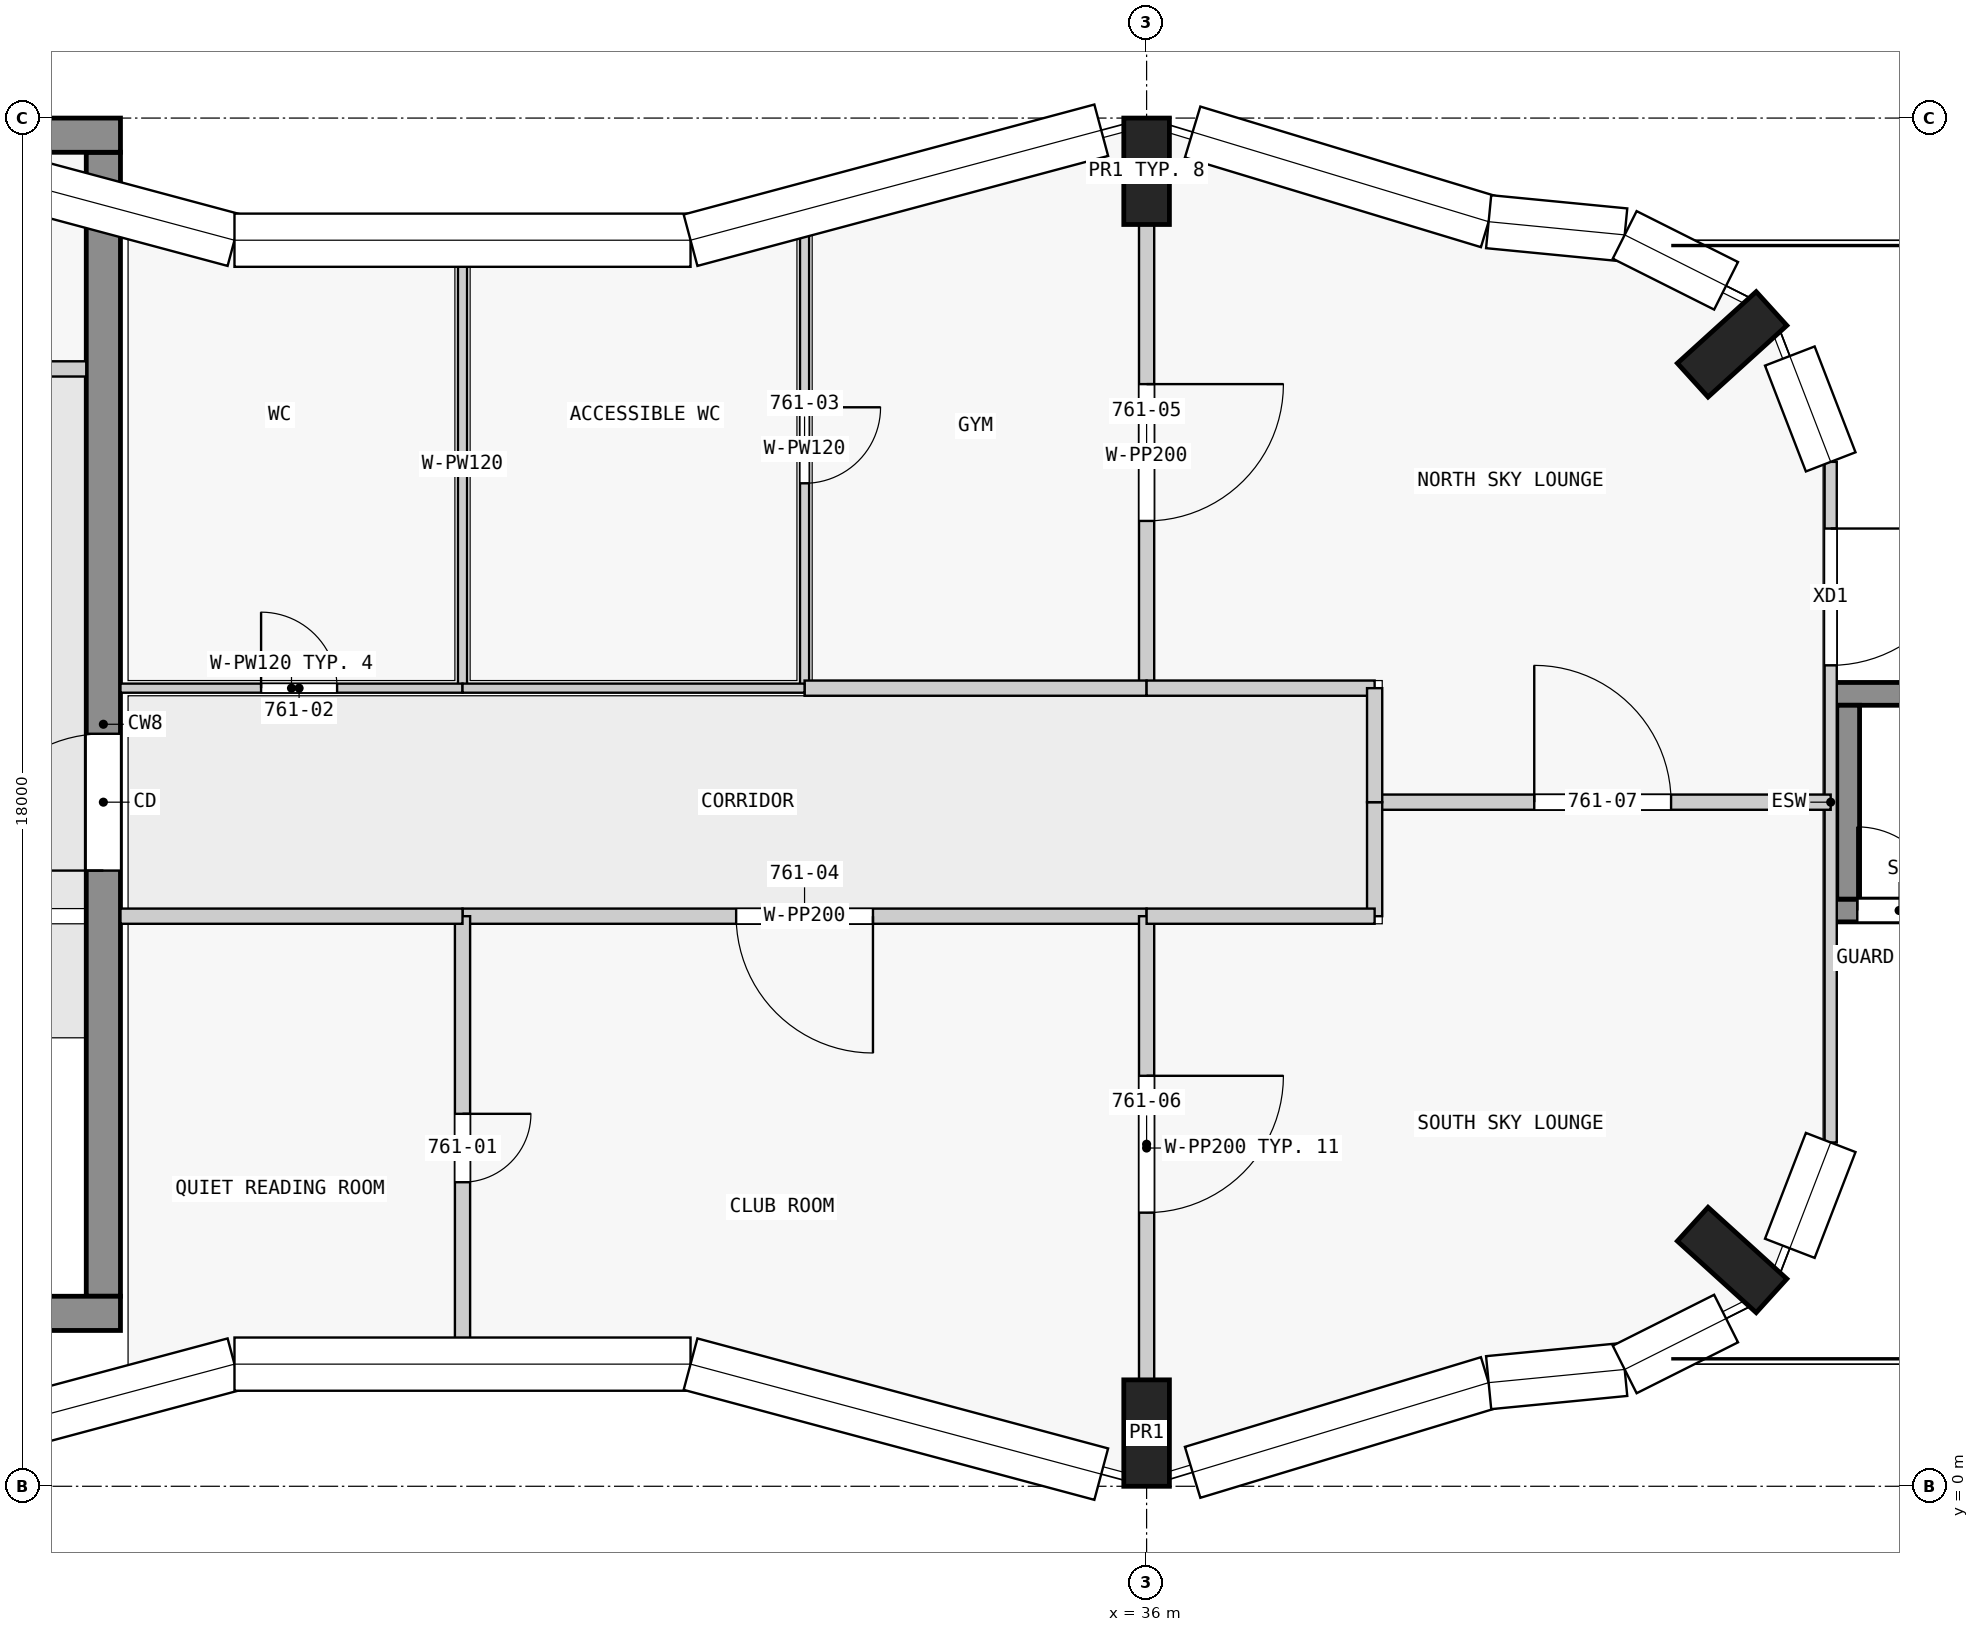
"""IFC4 building model, lengths in metres.
Left out: names, types, materials, properties, quantities, classifications, styles, units other than length and angle.
Written with IfcOpenShell. Run it as: python <this file> out.ifc"""

import sys

from ifc_helpers import new_model, si_unit, direction, frame, frame_2d, origin, origin_2d, place, context, subcontext, project, spatial, rectangle, extrude, element, fill, save


model = new_model("IFC4")
c1 = context("Model", 3, precision=1e-05, world=origin(), true_north=direction((0.0, 1.0)))
c2 = subcontext(c1, "Body", "Model", "MODEL_VIEW")
j1 = project(units=[si_unit("LENGTHUNIT", "METRE"), si_unit("PLANEANGLEUNIT", "RADIAN")], contexts=[c1])
p1 = place(None, origin())
s1 = spatial("IfcSite", under=j1, at=p1, CompositionType="ELEMENT")
p2 = place(p1, origin())
s2 = spatial("IfcBuilding", under=s1, at=p2, CompositionType="ELEMENT")
p3 = place(p2, frame((0.0, 0.0, 287.9)))
s3 = spatial("IfcBuildingStorey", under=s2, at=p3, CompositionType="ELEMENT", Elevation=287.9)
for number, where, z_axis, x_axis in (
    (1, (36.0, 0.7, 0.0), (0.0, 0.0, 1.0), (1.0, 0.0, 0.0)),
    (2, (43.703, 2.977, 0.0), (0.0, 0.0, 1.0), (0.672, 0.74, 0.0)),
    (3, (43.703, 15.023, 0.0), (0.0, 0.0, 1.0), (-0.672, 0.74, 0.0)),
    (4, (36.0, 17.3, 0.0), (0.0, 0.0, 1.0), (1.0, 0.0, 0.0)),
):
    element("IfcColumn", number, at=place(p3, frame(where, z_axis=z_axis, x_axis=x_axis)), inside=s3, PredefinedType="COLUMN", context=c2, shape_type="SweptSolid", body=[
        extrude(rectangle(XDim=0.6, YDim=1.4, at=origin_2d()), origin(), (0.0, 0.0, 1.0), 3.5),
    ])
for number, where, z_axis, x_axis in (
    (5, (1.85, 2.275, 0.0), (0.0, 0.0, 1.0), (1.0, 0.0, 0.0)),
    (6, (1.85, 17.775, 0.0), (0.0, 0.0, 1.0), (1.0, 0.0, 0.0)),
):
    element("IfcWall", number, at=place(p3, frame(where, z_axis=z_axis, x_axis=x_axis)), inside=s3, PredefinedType="SHEAR", context=c2, shape_type="SweptSolid", body=[
        extrude(rectangle(XDim=20.65, YDim=0.45, at=frame_2d((10.325, 0.0))), origin(), (0.0, 0.0, 1.0), 3.25),
    ])
p4 = place(p3, frame((22.275, 2.5, 0.0), z_axis=(0.0, 0.0, 1.0), x_axis=(0.0, 1.0, 0.0)))
e7 = element("IfcWall", 7, at=p4, inside=s3, PredefinedType="SHEAR", context=c2, shape_type="SweptSolid", body=[
    extrude(rectangle(XDim=15.05, YDim=0.45, at=frame_2d((7.525, 0.0))), origin(), (0.0, 0.0, 1.0), 3.25),
])
p5 = place(p4, frame((5.6, 0.0, 0.0)))
e8 = element("IfcOpeningElement", 8, at=p5, cuts=e7, PredefinedType="OPENING", context=c2, shape_type="SweptSolid", body=[
    extrude(rectangle(XDim=1.8, YDim=2.1, at=frame_2d((0.9, 1.05))), frame((0.0, 0.235, 0.0), z_axis=(0.0, -1.0, 0.0), x_axis=(1.0, 0.0, 0.0)), (0.0, 0.0, 1.0), 0.47),
])
p6 = place(p3, frame((45.23, 7.725, 0.0), z_axis=(0.0, 0.0, 1.0), x_axis=(0.0, 1.0, 0.0)))
e9 = element("IfcWall", 9, at=p6, inside=s3, PredefinedType="SHEAR", context=c2, shape_type="SweptSolid", body=[
    extrude(rectangle(XDim=2.55, YDim=0.3, at=frame_2d((1.275, 0.0))), origin(), (0.0, 0.0, 1.0), 3.25),
])
p7 = place(p3, frame((45.0, 7.575, 0.0), z_axis=(0.0, 0.0, 1.0), x_axis=(1.0, 0.0, 0.0)))
e10 = element("IfcWall", 10, at=p7, inside=s3, PredefinedType="SHEAR", context=c2, shape_type="SweptSolid", body=[
    extrude(rectangle(XDim=7.2, YDim=0.3, at=frame_2d((3.6, 0.0))), origin(), (0.0, 0.0, 1.0), 3.25),
])
p8 = place(p7, frame((0.35, 0.0, 0.0)))
e11 = element("IfcOpeningElement", 11, at=p8, cuts=e10, PredefinedType="OPENING", context=c2, shape_type="SweptSolid", body=[
    extrude(rectangle(XDim=1.1, YDim=2.1, at=frame_2d((0.55, 1.05))), frame((0.0, 0.16, 0.0), z_axis=(0.0, -1.0, 0.0), x_axis=(1.0, 0.0, 0.0)), (0.0, 0.0, 1.0), 0.32),
])
p9 = place(p3, frame((45.0, 10.425, 0.0), z_axis=(0.0, 0.0, 1.0), x_axis=(1.0, 0.0, 0.0)))
e12 = element("IfcWall", 12, at=p9, inside=s3, PredefinedType="SHEAR", context=c2, shape_type="SweptSolid", body=[
    extrude(rectangle(XDim=7.2, YDim=0.3, at=frame_2d((3.6, 0.0))), origin(), (0.0, 0.0, 1.0), 3.25),
])
p10 = place(p3, frame((45.0, 13.477, 0.0), z_axis=(0.0, 0.0, 1.0), x_axis=(0.0, -1.0, 0.0)))
e13 = element("IfcWall", 13, at=p10, inside=s3, PredefinedType="STANDARD", context=c2, shape_type="SweptSolid", body=[
    extrude(rectangle(XDim=8.954, YDim=0.16, at=frame_2d((4.477, 0.0))), origin(), (0.0, 0.0, 1.0), 3.25),
])
p11 = place(p10, frame((0.877, 0.0, 0.0)))
e14 = element("IfcOpeningElement", 14, at=p11, cuts=e13, PredefinedType="OPENING", context=c2, shape_type="SweptSolid", body=[
    extrude(rectangle(XDim=1.8, YDim=2.4, at=frame_2d((0.9, 1.2))), frame((0.0, 0.09, 0.0), z_axis=(0.0, -1.0, 0.0), x_axis=(1.0, 0.0, 0.0)), (0.0, 0.0, 1.0), 0.18),
])
p12 = place(p3, frame((18.6, 14.7, 0.0), z_axis=(0.0, 0.0, 1.0), x_axis=(1.0, 0.0, 0.0)))
e15 = element("IfcWall", 15, at=p12, inside=s3, PredefinedType="PARTITIONING", context=c2, shape_type="SweptSolid", body=[
    extrude(rectangle(XDim=3.45, YDim=0.2, at=frame_2d((1.725, 0.0))), origin(), (0.0, 0.0, 1.0), 3.25),
])
p13 = place(p12, frame((0.3, 0.0, 0.0)))
e16 = element("IfcOpeningElement", 16, at=p13, cuts=e15, PredefinedType="OPENING", context=c2, shape_type="SweptSolid", body=[
    extrude(rectangle(XDim=0.9, YDim=2.1, at=frame_2d((0.45, 1.05))), frame((0.0, 0.11, 0.0), z_axis=(0.0, -1.0, 0.0), x_axis=(1.0, 0.0, 0.0)), (0.0, 0.0, 1.0), 0.22),
])
p14 = place(p12, frame((2.025, 0.0, 0.0)))
e17 = element("IfcOpeningElement", 17, at=p14, cuts=e15, PredefinedType="OPENING", context=c2, shape_type="SweptSolid", body=[
    extrude(rectangle(XDim=0.9, YDim=2.1, at=frame_2d((0.45, 1.05))), frame((0.0, 0.11, 0.0), z_axis=(0.0, -1.0, 0.0), x_axis=(1.0, 0.0, 0.0)), (0.0, 0.0, 1.0), 0.22),
])
p15 = place(p3, frame((36.0, 7.5, 0.0), z_axis=(0.0, 0.0, 1.0), x_axis=(-1.0, 0.0, 0.0)))
e18 = element("IfcWall", 18, at=p15, inside=s3, PredefinedType="PARTITIONING", context=c2, shape_type="SweptSolid", body=[
    extrude(rectangle(XDim=9.0, YDim=0.2, at=frame_2d((4.5, 0.0))), origin(), (0.0, 0.0, 1.0), 3.25),
])
p16 = place(p15, frame((3.6, 0.0, 0.0)))
e19 = element("IfcOpeningElement", 19, at=p16, cuts=e18, PredefinedType="OPENING", context=c2, shape_type="SweptSolid", body=[
    extrude(rectangle(XDim=1.8, YDim=2.1, at=frame_2d((0.9, 1.05))), frame((0.0, 0.11, 0.0), z_axis=(0.0, -1.0, 0.0), x_axis=(1.0, 0.0, 0.0)), (0.0, 0.0, 1.0), 0.22),
])
p17 = place(p3, frame((36.0, 16.6, 0.0), z_axis=(0.0, 0.0, 1.0), x_axis=(0.0, -1.0, 0.0)))
e20 = element("IfcWall", 20, at=p17, inside=s3, PredefinedType="PARTITIONING", context=c2, shape_type="SweptSolid", body=[
    extrude(rectangle(XDim=6.1, YDim=0.2, at=frame_2d((3.05, 0.0))), origin(), (0.0, 0.0, 1.0), 3.25),
])
p18 = place(p17, frame((2.1, 0.0, 0.0)))
e21 = element("IfcOpeningElement", 21, at=p18, cuts=e20, PredefinedType="OPENING", context=c2, shape_type="SweptSolid", body=[
    extrude(rectangle(XDim=1.8, YDim=2.1, at=frame_2d((0.9, 1.05))), frame((0.0, 0.11, 0.0), z_axis=(0.0, -1.0, 0.0), x_axis=(1.0, 0.0, 0.0)), (0.0, 0.0, 1.0), 0.22),
])
p19 = place(p3, frame((36.0, 7.5, 0.0), z_axis=(0.0, 0.0, 1.0), x_axis=(0.0, -1.0, 0.0)))
e22 = element("IfcWall", 22, at=p19, inside=s3, PredefinedType="PARTITIONING", context=c2, shape_type="SweptSolid", body=[
    extrude(rectangle(XDim=6.1, YDim=0.2, at=frame_2d((3.05, 0.0))), origin(), (0.0, 0.0, 1.0), 3.25),
])
p20 = place(p19, frame((2.1, 0.0, 0.0)))
e23 = element("IfcOpeningElement", 23, at=p20, cuts=e22, PredefinedType="OPENING", context=c2, shape_type="SweptSolid", body=[
    extrude(rectangle(XDim=1.8, YDim=2.1, at=frame_2d((0.9, 1.05))), frame((0.0, 0.11, 0.0), z_axis=(0.0, -1.0, 0.0), x_axis=(1.0, 0.0, 0.0)), (0.0, 0.0, 1.0), 0.22),
])
p21 = place(p3, frame((31.5, 16.795, 0.0), z_axis=(0.0, 0.0, 1.0), x_axis=(0.0, -1.0, 0.0)))
e24 = element("IfcWall", 24, at=p21, inside=s3, PredefinedType="PARTITIONING", context=c2, shape_type="SweptSolid", body=[
    extrude(rectangle(XDim=6.295, YDim=0.12, at=frame_2d((3.147, 0.0))), origin(), (0.0, 0.0, 1.0), 3.25),
])
p22 = place(p21, frame((2.6, 0.0, 0.0)))
e25 = element("IfcOpeningElement", 25, at=p22, cuts=e24, PredefinedType="OPENING", context=c2, shape_type="SweptSolid", body=[
    extrude(rectangle(XDim=1.0, YDim=2.1, at=frame_2d((0.5, 1.05))), frame((0.0, 0.07, 0.0), z_axis=(0.0, -1.0, 0.0), x_axis=(1.0, 0.0, 0.0)), (0.0, 0.0, 1.0), 0.14),
])
p23 = place(p3, frame((39.0, 9.0, 0.0), z_axis=(0.0, 0.0, 1.0), x_axis=(1.0, 0.0, 0.0)))
e26 = element("IfcWall", 26, at=p23, inside=s3, PredefinedType="PARTITIONING", context=c2, shape_type="SweptSolid", body=[
    extrude(rectangle(XDim=6.0, YDim=0.2, at=frame_2d((3.0, 0.0))), origin(), (0.0, 0.0, 1.0), 2.642),
])
p24 = place(p23, frame((2.1, 0.0, 0.0)))
e27 = element("IfcOpeningElement", 27, at=p24, cuts=e26, PredefinedType="OPENING", context=c2, shape_type="SweptSolid", body=[
    extrude(rectangle(XDim=1.8, YDim=2.1, at=frame_2d((0.9, 1.05))), frame((0.0, 0.11, 0.0), z_axis=(0.0, -1.0, 0.0), x_axis=(1.0, 0.0, 0.0)), (0.0, 0.0, 1.0), 0.22),
])
p25 = place(p3, frame((27.0, 16.393, 0.0), z_axis=(0.0, 0.0, 1.0), x_axis=(0.0, -1.0, 0.0)))
e28 = element("IfcWall", 28, at=p25, inside=s3, PredefinedType="PARTITIONING", context=c2, shape_type="SweptSolid", body=[
    extrude(rectangle(XDim=5.893, YDim=0.12, at=frame_2d((2.947, 0.0))), origin(), (0.0, 0.0, 1.0), 3.25),
])
p26 = place(p3, frame((27.0, 7.5, 0.0), z_axis=(0.0, 0.0, 1.0), x_axis=(0.0, -1.0, 0.0)))
e29 = element("IfcWall", 29, at=p26, inside=s3, PredefinedType="PARTITIONING", context=c2, shape_type="SweptSolid", body=[
    extrude(rectangle(XDim=5.893, YDim=0.2, at=frame_2d((2.947, 0.0))), origin(), (0.0, 0.0, 1.0), 3.25),
])
p27 = place(p26, frame((2.6, 0.0, 0.0)))
e30 = element("IfcOpeningElement", 30, at=p27, cuts=e29, PredefinedType="OPENING", context=c2, shape_type="SweptSolid", body=[
    extrude(rectangle(XDim=0.9, YDim=2.1, at=frame_2d((0.45, 1.05))), frame((0.0, 0.11, 0.0), z_axis=(0.0, -1.0, 0.0), x_axis=(1.0, 0.0, 0.0)), (0.0, 0.0, 1.0), 0.22),
])
p28 = place(p3, frame((39.0, 9.0, 0.0), z_axis=(0.0, 0.0, 1.0), x_axis=(0.0, -1.0, 0.0)))
e31 = element("IfcWall", 31, at=p28, inside=s3, PredefinedType="PARTITIONING", context=c2, shape_type="SweptSolid", body=[
    extrude(rectangle(XDim=1.5, YDim=0.2, at=frame_2d((0.75, 0.0))), origin(), (0.0, 0.0, 1.0), 3.25),
])
p29 = place(p3, frame((39.0, 7.5, 0.0), z_axis=(0.0, 0.0, 1.0), x_axis=(-1.0, 0.0, 0.0)))
e32 = element("IfcWall", 32, at=p29, inside=s3, PredefinedType="PARTITIONING", context=c2, shape_type="SweptSolid", body=[
    extrude(rectangle(XDim=3.0, YDim=0.2, at=frame_2d((1.5, 0.0))), origin(), (0.0, 0.0, 1.0), 3.25),
])
p30 = place(p3, frame((31.5, 10.5, 0.0), z_axis=(0.0, 0.0, 1.0), x_axis=(1.0, 0.0, 0.0)))
e33 = element("IfcWall", 33, at=p30, inside=s3, PredefinedType="PARTITIONING", context=c2, shape_type="SweptSolid", body=[
    extrude(rectangle(XDim=4.5, YDim=0.2, at=frame_2d((2.25, 0.0))), origin(), (0.0, 0.0, 1.0), 3.25),
])
p31 = place(p3, frame((22.5, 10.5, 0.0), z_axis=(0.0, 0.0, 1.0), x_axis=(1.0, 0.0, 0.0)))
e34 = element("IfcWall", 34, at=p31, inside=s3, PredefinedType="PARTITIONING", context=c2, shape_type="SweptSolid", body=[
    extrude(rectangle(XDim=4.5, YDim=0.12, at=frame_2d((2.25, 0.0))), origin(), (0.0, 0.0, 1.0), 3.25),
])
p32 = place(p31, frame((1.85, 0.0, 0.0)))
e35 = element("IfcOpeningElement", 35, at=p32, cuts=e34, PredefinedType="OPENING", context=c2, shape_type="SweptSolid", body=[
    extrude(rectangle(XDim=1.0, YDim=2.1, at=frame_2d((0.5, 1.05))), frame((0.0, 0.07, 0.0), z_axis=(0.0, -1.0, 0.0), x_axis=(1.0, 0.0, 0.0)), (0.0, 0.0, 1.0), 0.14),
])
p33 = place(p3, frame((27.0, 10.5, 0.0), z_axis=(0.0, 0.0, 1.0), x_axis=(1.0, 0.0, 0.0)))
e36 = element("IfcWall", 36, at=p33, inside=s3, PredefinedType="PARTITIONING", context=c2, shape_type="SweptSolid", body=[
    extrude(rectangle(XDim=4.5, YDim=0.12, at=frame_2d((2.25, 0.0))), origin(), (0.0, 0.0, 1.0), 3.25),
])
p34 = place(p3, frame((27.0, 7.5, 0.0), z_axis=(0.0, 0.0, 1.0), x_axis=(-1.0, 0.0, 0.0)))
e37 = element("IfcWall", 37, at=p34, inside=s3, PredefinedType="PARTITIONING", context=c2, shape_type="SweptSolid", body=[
    extrude(rectangle(XDim=4.5, YDim=0.2, at=frame_2d((2.25, 0.0))), origin(), (0.0, 0.0, 1.0), 3.25),
])
p35 = place(p3, frame((36.0, 10.5, 0.0), z_axis=(0.0, 0.0, 1.0), x_axis=(1.0, 0.0, 0.0)))
e38 = element("IfcWall", 38, at=p35, inside=s3, PredefinedType="PARTITIONING", context=c2, shape_type="SweptSolid", body=[
    extrude(rectangle(XDim=3.0, YDim=0.2, at=frame_2d((1.5, 0.0))), origin(), (0.0, 0.0, 1.0), 3.25),
])
p36 = place(p3, frame((39.0, 10.5, 0.0), z_axis=(0.0, 0.0, 1.0), x_axis=(0.0, -1.0, 0.0)))
e39 = element("IfcWall", 39, at=p36, inside=s3, PredefinedType="PARTITIONING", context=c2, shape_type="SweptSolid", body=[
    extrude(rectangle(XDim=1.5, YDim=0.2, at=frame_2d((0.75, 0.0))), origin(), (0.0, 0.0, 1.0), 3.25),
])
p37 = place(p11, origin())
e40 = element("IfcDoor", 40, at=p37, inside=s3, OperationType="SINGLE_SWING_LEFT", PredefinedType="DOOR", context=c2, shape_type="SweptSolid", body=[
    extrude(rectangle(XDim=1.8, YDim=2.4, at=frame_2d((0.9, 1.2))), frame((0.0, 0.025, 0.0), z_axis=(0.0, -1.0, 0.0), x_axis=(1.0, 0.0, 0.0)), (0.0, 0.0, 1.0), 0.05),
])
fill(e14, e40)
p38 = place(p5, origin())
e41 = element("IfcDoor", 41, at=p38, inside=s3, OperationType="DOUBLE_DOOR_SINGLE_SWING", PredefinedType="DOOR", context=c2, shape_type="SweptSolid", body=[
    extrude(rectangle(XDim=1.8, YDim=2.1, at=frame_2d((0.9, 1.05))), frame((0.0, 0.025, 0.0), z_axis=(0.0, -1.0, 0.0), x_axis=(1.0, 0.0, 0.0)), (0.0, 0.0, 1.0), 0.05),
])
fill(e8, e41)
p39 = place(p8, origin())
e42 = element("IfcDoor", 42, at=p39, inside=s3, OperationType="SINGLE_SWING_LEFT", PredefinedType="DOOR", context=c2, shape_type="SweptSolid", body=[
    extrude(rectangle(XDim=1.1, YDim=2.1, at=frame_2d((0.55, 1.05))), frame((0.0, 0.025, 0.0), z_axis=(0.0, -1.0, 0.0), x_axis=(1.0, 0.0, 0.0)), (0.0, 0.0, 1.0), 0.05),
])
fill(e11, e42)
p40 = place(p27, origin())
e43 = element("IfcDoor", 43, at=p40, inside=s3, OperationType="SINGLE_SWING_LEFT", PredefinedType="DOOR", context=c2, shape_type="SweptSolid", body=[
    extrude(rectangle(XDim=0.9, YDim=2.1, at=frame_2d((0.45, 1.05))), frame((0.0, 0.025, 0.0), z_axis=(0.0, -1.0, 0.0), x_axis=(1.0, 0.0, 0.0)), (0.0, 0.0, 1.0), 0.05),
])
fill(e30, e43)
p41 = place(p32, origin())
e44 = element("IfcDoor", 44, at=p41, inside=s3, OperationType="SINGLE_SWING_LEFT", PredefinedType="DOOR", context=c2, shape_type="SweptSolid", body=[
    extrude(rectangle(XDim=1.0, YDim=2.1, at=frame_2d((0.5, 1.05))), frame((0.0, 0.025, 0.0), z_axis=(0.0, -1.0, 0.0), x_axis=(1.0, 0.0, 0.0)), (0.0, 0.0, 1.0), 0.05),
])
fill(e35, e44)
p42 = place(p22, origin())
e45 = element("IfcDoor", 45, at=p42, inside=s3, OperationType="SINGLE_SWING_LEFT", PredefinedType="DOOR", context=c2, shape_type="SweptSolid", body=[
    extrude(rectangle(XDim=1.0, YDim=2.1, at=frame_2d((0.5, 1.05))), frame((0.0, 0.025, 0.0), z_axis=(0.0, -1.0, 0.0), x_axis=(1.0, 0.0, 0.0)), (0.0, 0.0, 1.0), 0.05),
])
fill(e25, e45)
p43 = place(p16, origin())
e46 = element("IfcDoor", 46, at=p43, inside=s3, OperationType="DOUBLE_DOOR_SINGLE_SWING", PredefinedType="DOOR", context=c2, shape_type="SweptSolid", body=[
    extrude(rectangle(XDim=1.8, YDim=2.1, at=frame_2d((0.9, 1.05))), frame((0.0, 0.025, 0.0), z_axis=(0.0, -1.0, 0.0), x_axis=(1.0, 0.0, 0.0)), (0.0, 0.0, 1.0), 0.05),
])
fill(e19, e46)
p44 = place(p18, origin())
e47 = element("IfcDoor", 47, at=p44, inside=s3, OperationType="DOUBLE_DOOR_SINGLE_SWING", PredefinedType="DOOR", context=c2, shape_type="SweptSolid", body=[
    extrude(rectangle(XDim=1.8, YDim=2.1, at=frame_2d((0.9, 1.05))), frame((0.0, 0.025, 0.0), z_axis=(0.0, -1.0, 0.0), x_axis=(1.0, 0.0, 0.0)), (0.0, 0.0, 1.0), 0.05),
])
fill(e21, e47)
p45 = place(p20, origin())
e48 = element("IfcDoor", 48, at=p45, inside=s3, OperationType="DOUBLE_DOOR_SINGLE_SWING", PredefinedType="DOOR", context=c2, shape_type="SweptSolid", body=[
    extrude(rectangle(XDim=1.8, YDim=2.1, at=frame_2d((0.9, 1.05))), frame((0.0, 0.025, 0.0), z_axis=(0.0, -1.0, 0.0), x_axis=(1.0, 0.0, 0.0)), (0.0, 0.0, 1.0), 0.05),
])
fill(e23, e48)
p46 = place(p24, origin())
e49 = element("IfcDoor", 49, at=p46, inside=s3, OperationType="DOUBLE_DOOR_SINGLE_SWING", PredefinedType="DOOR", context=c2, shape_type="SweptSolid", body=[
    extrude(rectangle(XDim=1.8, YDim=2.1, at=frame_2d((0.9, 1.05))), frame((0.0, 0.025, 0.0), z_axis=(0.0, -1.0, 0.0), x_axis=(1.0, 0.0, 0.0)), (0.0, 0.0, 1.0), 0.05),
])
fill(e27, e49)
save(model, sys.argv[1])
